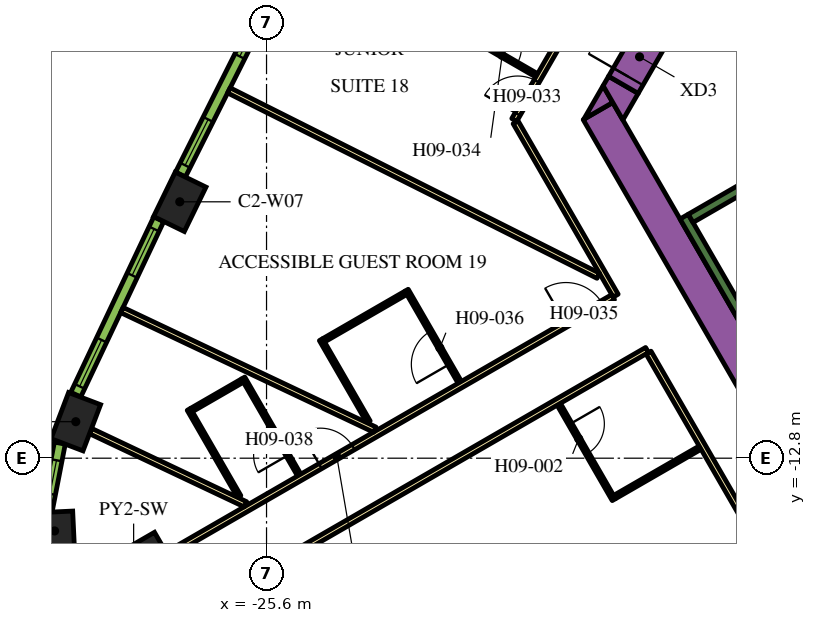
"""IFC4 building model, lengths in metres.
Left out: names, types, materials, properties, quantities, classifications, styles, units other than length and angle.
Written with IfcOpenShell. Run it as: python <this file> out.ifc"""

import sys

from ifc_helpers import new_model, si_unit, direction, frame, frame_2d, origin, origin_2d, place, context, subcontext, project, spatial, polyline, rectangle, outline, extrude, element, fill, save


model = new_model("IFC4")
c1 = context("Model", 3, precision=1e-05, world=origin(), true_north=direction((0.0, 1.0)))
c2 = subcontext(c1, "Body", "Model", "MODEL_VIEW")
j1 = project(units=[si_unit("LENGTHUNIT", "METRE"), si_unit("PLANEANGLEUNIT", "RADIAN")], contexts=[c1])
p1 = place(None, origin())
s1 = spatial("IfcSite", under=j1, at=p1, CompositionType="ELEMENT")
p2 = place(p1, origin())
s2 = spatial("IfcBuilding", under=s1, at=p2, CompositionType="ELEMENT")
p3 = place(p2, frame((0.0, 0.0, 118.8)))
s3 = spatial("IfcBuildingStorey", under=s2, at=p3, CompositionType="ELEMENT", Elevation=118.8)
p4 = place(p3, frame((-29.097, -16.799, 0.0), z_axis=(0.0, 0.0, 1.0), x_axis=(-0.866025403784, -0.5, 0.0)))
e1 = element("IfcColumn", 1, at=p4, inside=s3, PredefinedType="COLUMN", context=c2, shape_type="SweptSolid", body=[
    extrude(rectangle(XDim=3.0, YDim=3.0, at=origin_2d()), origin(), (0.0, 0.0, 1.0), 3.9),
])
for number, where, z_axis, x_axis in (
    (2, (-27.883, -6.054, 0.0), (0.0, 0.0, 1.0), (-0.438, -0.899, 0.0)),
    (3, (-30.619, -11.839, 0.0), (0.0, 0.0, 1.0), (-0.355, -0.935, 0.0)),
):
    element("IfcColumn", number, at=place(p3, frame(where, z_axis=z_axis, x_axis=x_axis)), inside=s3, PredefinedType="COLUMN", context=c2, shape_type="SweptSolid", body=[
        extrude(rectangle(XDim=1.3, YDim=0.9, at=origin_2d()), origin(), (0.0, 0.0, 1.0), 3.9),
    ])
p5 = place(p3, frame((-31.177, -14.714, 0.0), z_axis=(0.0, 0.0, 1.0), x_axis=(0.046756026083, -0.998906338965, 0.0)))
e4 = element("IfcColumn", 4, at=p5, inside=s3, PredefinedType="COLUMN", context=c2, shape_type="SweptSolid", body=[
    extrude(rectangle(XDim=1.0, YDim=1.0, at=origin_2d()), origin(), (0.0, 0.0, 1.0), 3.9),
])
p6 = place(p3, frame((-12.134, -11.883, 0.0), z_axis=(0.0, 0.0, 1.0), x_axis=(-0.500005339912, 0.866022320763, 0.0)))
e5 = element("IfcWall", 5, at=p6, inside=s3, PredefinedType="SOLIDWALL", context=c2, shape_type="SweptSolid", body=[
    extrude(rectangle(XDim=9.488, YDim=0.9, at=frame_2d((4.744, 0.0))), origin(), (0.0, 0.0, 1.0), 3.9),
])
p7 = place(p3, origin())
e6 = element("IfcWall", 6, at=p7, inside=s3, PredefinedType="SOLIDWALL", context=c2, shape_type="SweptSolid", body=[
    extrude(outline(polyline([(-16.489, -3.44), (-17.251, -3.88), (-16.743, -3.0), (-16.489, -3.44)])), origin(), (0.0, 0.0, 1.0), 3.9),
])
e7 = element("IfcWall", 7, at=p7, inside=s3, PredefinedType="SOLIDWALL", context=c2, shape_type="SweptSolid", body=[
    extrude(outline(polyline([(-15.82, -3.201), (-16.223, -3.9), (-16.743, -3.0), (-16.599, -2.751), (-15.82, -3.201)])), origin(), (0.0, 0.0, 1.0), 3.9),
])
p8 = place(p3, frame((-12.885, -9.431, 0.0), z_axis=(0.0, 0.0, 1.0), x_axis=(-0.500020560727, 0.866013532718, 0.0)))
e8 = element("IfcWall", 8, at=p8, inside=s3, PredefinedType="SOLIDWALL", context=c2, shape_type="SweptSolid", body=[
    extrude(rectangle(XDim=3.45, YDim=0.25, at=frame_2d((1.725, 0.0))), origin(), (0.0, 0.0, 1.0), 3.9),
])
p9 = place(p3, frame((-14.44, -6.49, 0.0), z_axis=(0.0, 0.0, 1.0), x_axis=(0.866022966069, 0.500004222222, 0.0)))
e9 = element("IfcWall", 9, at=p9, inside=s3, PredefinedType="SOLIDWALL", context=c2, shape_type="SweptSolid", body=[
    extrude(rectangle(XDim=6.8, YDim=0.25, at=frame_2d((3.4, 0.0))), origin(), (0.0, 0.0, 1.0), 3.9),
])
p10 = place(p3, frame((-16.209, -2.976, 0.0), z_axis=(0.0, 0.0, 1.0), x_axis=(0.499954529098, 0.86605165483, 0.0)))
e10 = element("IfcWall", 10, at=p10, inside=s3, PredefinedType="SOLIDWALL", context=c2, shape_type="SweptSolid", body=[
    extrude(rectangle(XDim=1.7, YDim=0.9, at=frame_2d((0.85, 0.0))), origin(), (0.0, 0.0, 1.0), 3.9),
])
p11 = place(p10, frame((0.25, 0.0, 0.0)))
e11 = element("IfcOpeningElement", 11, at=p11, cuts=e10, PredefinedType="OPENING", context=c2, shape_type="SweptSolid", body=[
    extrude(rectangle(XDim=1.2, YDim=2.1, at=frame_2d((0.6, 1.05))), frame((0.0, 0.46, 0.0), z_axis=(0.0, -1.0, 0.0), x_axis=(1.0, 0.0, 0.0)), (0.0, 0.0, 1.0), 0.92),
])
p12 = place(p3, frame((-19.081, -3.9, 0.0), z_axis=(0.0, 0.0, 1.0), x_axis=(0.499998313975, 0.866026377209, 0.0)))
e12 = element("IfcWall", 12, at=p12, inside=s3, PredefinedType="PARTITIONING", context=c2, shape_type="SweptSolid", body=[
    extrude(rectangle(XDim=25.766, YDim=0.15, at=frame_2d((12.883, 0.0))), origin(), (0.0, 0.0, 1.0), 2.75),
])
p13 = place(p12, frame((19.306, 0.0, 0.0)))
e13 = element("IfcOpeningElement", 13, at=p13, cuts=e12, PredefinedType="OPENING", context=c2, shape_type="SweptSolid", body=[
    extrude(rectangle(XDim=1.0, YDim=2.1, at=frame_2d((0.5, 1.05))), frame((0.0, 0.085, 0.0), z_axis=(0.0, -1.0, 0.0), x_axis=(1.0, 0.0, 0.0)), (0.0, 0.0, 1.0), 0.17),
])
p14 = place(p12, frame((18.0, 0.0, 0.0)))
e14 = element("IfcOpeningElement", 14, at=p14, cuts=e12, PredefinedType="OPENING", context=c2, shape_type="SweptSolid", body=[
    extrude(rectangle(XDim=1.0, YDim=2.1, at=frame_2d((0.5, 1.05))), frame((0.0, 0.085, 0.0), z_axis=(0.0, -1.0, 0.0), x_axis=(1.0, 0.0, 0.0)), (0.0, 0.0, 1.0), 0.17),
])
p15 = place(p12, frame((7.793, 0.0, 0.0)))
e15 = element("IfcOpeningElement", 15, at=p15, cuts=e12, PredefinedType="OPENING", context=c2, shape_type="SweptSolid", body=[
    extrude(rectangle(XDim=0.9, YDim=2.1, at=frame_2d((0.45, 1.05))), frame((0.0, 0.085, 0.0), z_axis=(0.0, -1.0, 0.0), x_axis=(1.0, 0.0, 0.0)), (0.0, 0.0, 1.0), 0.17),
])
p16 = place(p12, frame((4.674, 0.0, 0.0)))
e16 = element("IfcOpeningElement", 16, at=p16, cuts=e12, PredefinedType="OPENING", context=c2, shape_type="SweptSolid", body=[
    extrude(rectangle(XDim=0.9, YDim=2.1, at=frame_2d((0.45, 1.05))), frame((0.0, 0.085, 0.0), z_axis=(0.0, -1.0, 0.0), x_axis=(1.0, 0.0, 0.0)), (0.0, 0.0, 1.0), 0.17),
])
p17 = place(p12, frame((0.18, 0.0, 0.0)))
e17 = element("IfcOpeningElement", 17, at=p17, cuts=e12, PredefinedType="OPENING", context=c2, shape_type="SweptSolid", body=[
    extrude(rectangle(XDim=1.0, YDim=2.1, at=frame_2d((0.5, 1.05))), frame((0.0, 0.085, 0.0), z_axis=(0.0, -1.0, 0.0), x_axis=(1.0, 0.0, 0.0)), (0.0, 0.0, 1.0), 0.17),
])
p18 = place(p3, frame((-16.412, -8.523, 0.0), z_axis=(0.0, 0.0, 1.0), x_axis=(-0.500001929737, 0.866024289647, 0.0)))
e18 = element("IfcWall", 18, at=p18, inside=s3, PredefinedType="PARTITIONING", context=c2, shape_type="SweptSolid", body=[
    extrude(rectangle(XDim=5.268, YDim=0.15, at=frame_2d((2.634, 0.0))), origin(), (0.0, 0.0, 1.0), 2.75),
])
p19 = place(p3, frame((-28.211, -15.335, 0.0), z_axis=(0.0, 0.0, 1.0), x_axis=(0.866025884867, 0.49999916674, 0.0)))
e19 = element("IfcWall", 19, at=p19, inside=s3, PredefinedType="PARTITIONING", context=c2, shape_type="SweptSolid", body=[
    extrude(rectangle(XDim=13.543, YDim=0.15, at=frame_2d((6.772, 0.0))), origin(), (0.0, 0.0, 1.0), 2.75),
])
p20 = place(p19, frame((12.114, 0.0, 0.0)))
e20 = element("IfcOpeningElement", 20, at=p20, cuts=e19, PredefinedType="OPENING", context=c2, shape_type="SweptSolid", body=[
    extrude(rectangle(XDim=1.1, YDim=2.1, at=frame_2d((0.55, 1.05))), frame((0.0, 0.085, 0.0), z_axis=(0.0, -1.0, 0.0), x_axis=(1.0, 0.0, 0.0)), (0.0, 0.0, 1.0), 0.17),
])
p21 = place(p19, frame((4.65, 0.0, 0.0)))
e21 = element("IfcOpeningElement", 21, at=p21, cuts=e19, PredefinedType="OPENING", context=c2, shape_type="SweptSolid", body=[
    extrude(rectangle(XDim=1.0, YDim=2.1, at=frame_2d((0.5, 1.05))), frame((0.0, 0.085, 0.0), z_axis=(0.0, -1.0, 0.0), x_axis=(1.0, 0.0, 0.0)), (0.0, 0.0, 1.0), 0.17),
])
p22 = place(p3, frame((-15.587, -9.952, 0.0), z_axis=(0.0, 0.0, 1.0), x_axis=(-0.866017869832, -0.500013048961, 0.0)))
e22 = element("IfcWall", 22, at=p22, inside=s3, PredefinedType="PARTITIONING", context=c2, shape_type="SweptSolid", body=[
    extrude(rectangle(XDim=13.624, YDim=0.15, at=frame_2d((6.812, 0.0))), origin(), (0.0, 0.0, 1.0), 2.75),
])
p23 = place(p22, frame((12.344, 0.0, 0.0)))
e23 = element("IfcOpeningElement", 23, at=p23, cuts=e22, PredefinedType="OPENING", context=c2, shape_type="SweptSolid", body=[
    extrude(rectangle(XDim=1.1, YDim=2.1, at=frame_2d((0.55, 1.05))), frame((0.0, 0.085, 0.0), z_axis=(0.0, -1.0, 0.0), x_axis=(1.0, 0.0, 0.0)), (0.0, 0.0, 1.0), 0.17),
])
p24 = place(p3, frame((-12.918, -14.575, 0.0), z_axis=(0.0, 0.0, 1.0), x_axis=(-0.500009150678, 0.866020120573, 0.0)))
e24 = element("IfcWall", 24, at=p24, inside=s3, PredefinedType="PARTITIONING", context=c2, shape_type="SweptSolid", body=[
    extrude(rectangle(XDim=5.258, YDim=0.15, at=frame_2d((2.629, 0.0))), origin(), (0.0, 0.0, 1.0), 2.75),
])
p25 = place(p3, frame((-30.231, -12.085, 0.0), z_axis=(0.0, 0.0, 1.0), x_axis=(0.904001132572, -0.427530060122, 0.0)))
e25 = element("IfcWall", 25, at=p25, inside=s3, PredefinedType="PARTITIONING", context=c2, shape_type="SweptSolid", body=[
    extrude(rectangle(XDim=4.51, YDim=0.15, at=frame_2d((2.255, 0.0))), origin(), (0.0, 0.0, 1.0), 2.75),
])
p26 = place(p3, frame((-29.406, -8.901, 0.0), z_axis=(0.0, 0.0, 1.0), x_axis=(0.904002363742, -0.427527456836, 0.0)))
e26 = element("IfcWall", 26, at=p26, inside=s3, PredefinedType="PARTITIONING", context=c2, shape_type="SweptSolid", body=[
    extrude(rectangle(XDim=7.362, YDim=0.15, at=frame_2d((3.681, 0.0))), origin(), (0.0, 0.0, 1.0), 2.75),
])
p27 = place(p3, frame((-26.591, -3.122, 0.0), z_axis=(0.0, 0.0, 1.0), x_axis=(0.893766213273, -0.448533115847, 0.0)))
e27 = element("IfcWall", 27, at=p27, inside=s3, PredefinedType="PARTITIONING", context=c2, shape_type="SweptSolid", body=[
    extrude(rectangle(XDim=10.875, YDim=0.15, at=frame_2d((5.438, 0.0))), origin(), (0.0, 0.0, 1.0), 2.75),
])
p28 = place(p3, frame((-17.91, -11.38, 0.0), z_axis=(0.0, 0.0, 1.0), x_axis=(0.499987231761, -0.866032775405, 0.0)))
e28 = element("IfcWall", 28, at=p28, inside=s3, PredefinedType="PARTITIONING", context=c2, shape_type="SweptSolid", body=[
    extrude(rectangle(XDim=2.9, YDim=0.1, at=frame_2d((1.45, 0.0))), origin(), (0.0, 0.0, 1.0), 2.75),
])
p29 = place(p28, frame((0.6, 0.0, 0.0)))
e29 = element("IfcOpeningElement", 29, at=p29, cuts=e28, PredefinedType="OPENING", context=c2, shape_type="SweptSolid", body=[
    extrude(rectangle(XDim=0.9, YDim=2.1, at=frame_2d((0.45, 1.05))), frame((0.0, 0.06, 0.0), z_axis=(0.0, -1.0, 0.0), x_axis=(1.0, 0.0, 0.0)), (0.0, 0.0, 1.0), 0.12),
])
p30 = place(p3, frame((-16.442, -13.823, 0.0), z_axis=(0.0, 0.0, 1.0), x_axis=(0.866021400173, 0.500006934395, 0.0)))
e30 = element("IfcWall", 30, at=p30, inside=s3, PredefinedType="PARTITIONING", context=c2, shape_type="SweptSolid", body=[
    extrude(rectangle(XDim=2.6, YDim=0.1, at=frame_2d((1.3, 0.0))), origin(), (0.0, 0.0, 1.0), 2.75),
])
p31 = place(p3, frame((-20.829, -1.377, 0.0), z_axis=(0.0, 0.0, 1.0), x_axis=(0.866036505625, -0.499980770555, 0.0)))
e31 = element("IfcWall", 31, at=p31, inside=s3, PredefinedType="PARTITIONING", context=c2, shape_type="SweptSolid", body=[
    extrude(rectangle(XDim=2.7, YDim=0.1, at=frame_2d((1.35, 0.0))), origin(), (0.0, 0.0, 1.0), 2.75),
])
p32 = place(p31, frame((1.2, 0.0, 0.0)))
e32 = element("IfcOpeningElement", 32, at=p32, cuts=e31, PredefinedType="OPENING", context=c2, shape_type="SweptSolid", body=[
    extrude(rectangle(XDim=0.9, YDim=2.1, at=frame_2d((0.45, 1.05))), frame((0.0, 0.06, 0.0), z_axis=(0.0, -1.0, 0.0), x_axis=(1.0, 0.0, 0.0)), (0.0, 0.0, 1.0), 0.12),
])
p33 = place(p3, frame((-20.515, -10.805, 0.0), z_axis=(0.0, 0.0, 1.0), x_axis=(-0.49994636267, 0.866056369097, 0.0)))
e33 = element("IfcWall", 33, at=p33, inside=s3, PredefinedType="PARTITIONING", context=c2, shape_type="SweptSolid", body=[
    extrude(rectangle(XDim=2.8, YDim=0.1, at=frame_2d((1.4, 0.0))), origin(), (0.0, 0.0, 1.0), 2.75),
])
p34 = place(p33, frame((0.55, 0.0, 0.0)))
e34 = element("IfcOpeningElement", 34, at=p34, cuts=e33, PredefinedType="OPENING", context=c2, shape_type="SweptSolid", body=[
    extrude(rectangle(XDim=1.0, YDim=2.1, at=frame_2d((0.5, 1.05))), frame((0.0, 0.06, 0.0), z_axis=(0.0, -1.0, 0.0), x_axis=(1.0, 0.0, 0.0)), (0.0, 0.0, 1.0), 0.12),
])
for number, where, z_axis, x_axis in (
    (35, (-21.933, -8.448, 0.0), (0.0, 0.0, 1.0), (-0.866, -0.5, 0.0)),
    (36, (-22.916, -11.845, 0.0), (0.0, 0.0, 1.0), (-0.5, 0.866, 0.0)),
):
    element("IfcWall", number, at=place(p3, frame(where, z_axis=z_axis, x_axis=x_axis)), inside=s3, PredefinedType="PARTITIONING", context=c2, shape_type="SweptSolid", body=[
        extrude(rectangle(XDim=2.5, YDim=0.1, at=frame_2d((1.25, 0.0))), origin(), (0.0, 0.0, 1.0), 2.75),
    ])
p35 = place(p3, frame((-24.74, -13.244, 0.0), z_axis=(0.0, 0.0, 1.0), x_axis=(-0.500037662692, 0.866003658127, 0.0)))
e37 = element("IfcWall", 37, at=p35, inside=s3, PredefinedType="PARTITIONING", context=c2, shape_type="SweptSolid", body=[
    extrude(rectangle(XDim=2.95, YDim=0.1, at=frame_2d((1.475, 0.0))), origin(), (0.0, 0.0, 1.0), 2.75),
])
p36 = place(p35, frame((0.6, 0.0, 0.0)))
e38 = element("IfcOpeningElement", 38, at=p36, cuts=e37, PredefinedType="OPENING", context=c2, shape_type="SweptSolid", body=[
    extrude(rectangle(XDim=0.9, YDim=2.1, at=frame_2d((0.45, 1.05))), frame((0.0, 0.06, 0.0), z_axis=(0.0, -1.0, 0.0), x_axis=(1.0, 0.0, 0.0)), (0.0, 0.0, 1.0), 0.12),
])
p37 = place(p3, frame((-26.233, -10.758, 0.0), z_axis=(0.0, 0.0, 1.0), x_axis=(-0.866043940782, -0.499967891604, 0.0)))
e39 = element("IfcWall", 39, at=p37, inside=s3, PredefinedType="PARTITIONING", context=c2, shape_type="SweptSolid", body=[
    extrude(rectangle(XDim=1.55, YDim=0.1, at=frame_2d((0.775, 0.0))), origin(), (0.0, 0.0, 1.0), 2.75),
])
p38 = place(p3, frame((-26.319, -13.81, 0.0), z_axis=(0.0, 0.0, 1.0), x_axis=(-0.499953715521, 0.866052124492, 0.0)))
e40 = element("IfcWall", 40, at=p38, inside=s3, PredefinedType="PARTITIONING", context=c2, shape_type="SweptSolid", body=[
    extrude(rectangle(XDim=2.65, YDim=0.1, at=frame_2d((1.325, 0.0))), origin(), (0.0, 0.0, 1.0), 2.75),
])
p39 = place(p3, frame((-25.576, -0.778, 0.0), z_axis=(0.0, 0.0, 1.0), x_axis=(-0.448534297211, -0.893765620409, 0.0)))
e41 = element("IfcWall", 41, at=p39, inside=s3, PredefinedType="SOLIDWALL", context=c2, shape_type="SweptSolid", body=[
    extrude(rectangle(XDim=5.1, YDim=0.29, at=frame_2d((2.55, 0.0))), origin(), (0.0, 0.0, 1.0), 3.65),
])
p40 = place(p39, frame((0.272, 0.0, 0.9)))
e42 = element("IfcOpeningElement", 42, at=p40, cuts=e41, PredefinedType="OPENING", context=c2, shape_type="SweptSolid", body=[
    extrude(rectangle(XDim=1.35, YDim=2.15, at=frame_2d((0.675, 1.075))), frame((0.0, 0.155, 0.0), z_axis=(0.0, -1.0, 0.0), x_axis=(1.0, 0.0, 0.0)), (0.0, 0.0, 1.0), 0.31),
])
p41 = place(p39, frame((3.478, 0.0, 0.9)))
e43 = element("IfcOpeningElement", 43, at=p41, cuts=e41, PredefinedType="OPENING", context=c2, shape_type="SweptSolid", body=[
    extrude(rectangle(XDim=1.35, YDim=2.15, at=frame_2d((0.675, 1.075))), frame((0.0, 0.155, 0.0), z_axis=(0.0, -1.0, 0.0), x_axis=(1.0, 0.0, 0.0)), (0.0, 0.0, 1.0), 0.31),
])
p42 = place(p3, frame((-28.436, -6.511, 0.0), z_axis=(0.0, 0.0, 1.0), x_axis=(-0.427543726596, -0.903994669148, 0.0)))
e44 = element("IfcWall", 44, at=p42, inside=s3, PredefinedType="SOLIDWALL", context=c2, shape_type="SweptSolid", body=[
    extrude(rectangle(XDim=5.107, YDim=0.29, at=frame_2d((2.553, 0.0))), origin(), (0.0, 0.0, 1.0), 3.65),
])
p43 = place(p42, frame((0.285, 0.0, 0.9)))
e45 = element("IfcOpeningElement", 45, at=p43, cuts=e44, PredefinedType="OPENING", context=c2, shape_type="SweptSolid", body=[
    extrude(rectangle(XDim=1.35, YDim=2.15, at=frame_2d((0.675, 1.075))), frame((0.0, 0.155, 0.0), z_axis=(0.0, -1.0, 0.0), x_axis=(1.0, 0.0, 0.0)), (0.0, 0.0, 1.0), 0.31),
])
p44 = place(p42, frame((3.516, 0.0, 0.9)))
e46 = element("IfcOpeningElement", 46, at=p44, cuts=e44, PredefinedType="OPENING", context=c2, shape_type="SweptSolid", body=[
    extrude(rectangle(XDim=1.35, YDim=2.15, at=frame_2d((0.675, 1.075))), frame((0.0, 0.155, 0.0), z_axis=(0.0, -1.0, 0.0), x_axis=(1.0, 0.0, 0.0)), (0.0, 0.0, 1.0), 0.31),
])
p45 = place(p3, frame((-31.039, -12.403, 0.0), z_axis=(0.0, 0.0, 1.0), x_axis=(-0.190409913989, -0.981704672829, 0.0)))
e47 = element("IfcWall", 47, at=p45, inside=s3, PredefinedType="SOLIDWALL", context=c2, shape_type="SweptSolid", body=[
    extrude(rectangle(XDim=1.819, YDim=0.29, at=frame_2d((0.91, 0.0))), origin(), (0.0, 0.0, 1.0), 3.65),
])
p46 = place(p45, frame((0.46, 0.0, 0.9)))
e48 = element("IfcOpeningElement", 48, at=p46, cuts=e47, PredefinedType="OPENING", context=c2, shape_type="SweptSolid", body=[
    extrude(rectangle(XDim=0.9, YDim=2.15, at=frame_2d((0.45, 1.075))), frame((0.0, 0.155, 0.0), z_axis=(0.0, -1.0, 0.0), x_axis=(1.0, 0.0, 0.0)), (0.0, 0.0, 1.0), 0.31),
])
p47 = place(p11, origin())
e49 = element("IfcDoor", 49, at=p47, inside=s3, OperationType="SINGLE_SWING_LEFT", PredefinedType="DOOR", context=c2, shape_type="SweptSolid", body=[
    extrude(rectangle(XDim=1.2, YDim=2.1, at=frame_2d((0.6, 1.05))), frame((0.0, 0.025, 0.0), z_axis=(0.0, -1.0, 0.0), x_axis=(1.0, 0.0, 0.0)), (0.0, 0.0, 1.0), 0.05),
])
fill(e11, e49)
p48 = place(p29, origin())
e50 = element("IfcDoor", 50, at=p48, inside=s3, OperationType="SINGLE_SWING_LEFT", PredefinedType="DOOR", context=c2, shape_type="SweptSolid", body=[
    extrude(rectangle(XDim=0.9, YDim=2.1, at=frame_2d((0.45, 1.05))), frame((0.0, 0.025, 0.0), z_axis=(0.0, -1.0, 0.0), x_axis=(1.0, 0.0, 0.0)), (0.0, 0.0, 1.0), 0.05),
])
fill(e29, e50)
p49 = place(p17, origin())
e51 = element("IfcDoor", 51, at=p49, inside=s3, OperationType="SINGLE_SWING_LEFT", PredefinedType="DOOR", context=c2, shape_type="SweptSolid", body=[
    extrude(rectangle(XDim=1.0, YDim=2.1, at=frame_2d((0.5, 1.05))), frame((0.0, 0.025, 0.0), z_axis=(0.0, -1.0, 0.0), x_axis=(1.0, 0.0, 0.0)), (0.0, 0.0, 1.0), 0.05),
])
fill(e17, e51)
p50 = place(p32, origin())
e52 = element("IfcDoor", 52, at=p50, inside=s3, OperationType="SINGLE_SWING_RIGHT", PredefinedType="DOOR", context=c2, shape_type="SweptSolid", body=[
    extrude(rectangle(XDim=0.9, YDim=2.1, at=frame_2d((0.45, 1.05))), frame((0.0, 0.025, 0.0), z_axis=(0.0, -1.0, 0.0), x_axis=(1.0, 0.0, 0.0)), (0.0, 0.0, 1.0), 0.05),
])
fill(e32, e52)
p51 = place(p20, origin())
e53 = element("IfcDoor", 53, at=p51, inside=s3, OperationType="SINGLE_SWING_RIGHT", PredefinedType="DOOR", context=c2, shape_type="SweptSolid", body=[
    extrude(rectangle(XDim=1.1, YDim=2.1, at=frame_2d((0.55, 1.05))), frame((0.0, 0.025, 0.0), z_axis=(0.0, -1.0, 0.0), x_axis=(1.0, 0.0, 0.0)), (0.0, 0.0, 1.0), 0.05),
])
fill(e20, e53)
p52 = place(p34, origin())
e54 = element("IfcDoor", 54, at=p52, inside=s3, OperationType="SINGLE_SWING_LEFT", PredefinedType="DOOR", context=c2, shape_type="SweptSolid", body=[
    extrude(rectangle(XDim=1.0, YDim=2.1, at=frame_2d((0.5, 1.05))), frame((0.0, 0.025, 0.0), z_axis=(0.0, -1.0, 0.0), x_axis=(1.0, 0.0, 0.0)), (0.0, 0.0, 1.0), 0.05),
])
fill(e34, e54)
p53 = place(p21, origin())
e55 = element("IfcDoor", 55, at=p53, inside=s3, OperationType="SINGLE_SWING_RIGHT", PredefinedType="DOOR", context=c2, shape_type="SweptSolid", body=[
    extrude(rectangle(XDim=1.0, YDim=2.1, at=frame_2d((0.5, 1.05))), frame((0.0, 0.025, 0.0), z_axis=(0.0, -1.0, 0.0), x_axis=(1.0, 0.0, 0.0)), (0.0, 0.0, 1.0), 0.05),
])
fill(e21, e55)
p54 = place(p36, origin())
e56 = element("IfcDoor", 56, at=p54, inside=s3, OperationType="SINGLE_SWING_LEFT", PredefinedType="DOOR", context=c2, shape_type="SweptSolid", body=[
    extrude(rectangle(XDim=0.9, YDim=2.1, at=frame_2d((0.45, 1.05))), frame((0.0, 0.025, 0.0), z_axis=(0.0, -1.0, 0.0), x_axis=(1.0, 0.0, 0.0)), (0.0, 0.0, 1.0), 0.05),
])
fill(e38, e56)
p55 = place(p40, origin())
e57 = element("IfcWindow", 57, at=p55, inside=s3, PartitioningType="DOUBLE_PANEL_VERTICAL", PredefinedType="WINDOW", context=c2, shape_type="SweptSolid", body=[
    extrude(rectangle(XDim=1.35, YDim=2.15, at=frame_2d((0.675, 1.075))), frame((0.0, 0.015, 0.0), z_axis=(0.0, -1.0, 0.0), x_axis=(1.0, 0.0, 0.0)), (0.0, 0.0, 1.0), 0.06),
])
fill(e42, e57)
p56 = place(p41, origin())
e58 = element("IfcWindow", 58, at=p56, inside=s3, PartitioningType="DOUBLE_PANEL_VERTICAL", PredefinedType="WINDOW", context=c2, shape_type="SweptSolid", body=[
    extrude(rectangle(XDim=1.35, YDim=2.15, at=frame_2d((0.675, 1.075))), frame((0.0, 0.015, 0.0), z_axis=(0.0, -1.0, 0.0), x_axis=(1.0, 0.0, 0.0)), (0.0, 0.0, 1.0), 0.06),
])
fill(e43, e58)
p57 = place(p43, origin())
e59 = element("IfcWindow", 59, at=p57, inside=s3, PartitioningType="DOUBLE_PANEL_VERTICAL", PredefinedType="WINDOW", context=c2, shape_type="SweptSolid", body=[
    extrude(rectangle(XDim=1.35, YDim=2.15, at=frame_2d((0.675, 1.075))), frame((0.0, 0.015, 0.0), z_axis=(0.0, -1.0, 0.0), x_axis=(1.0, 0.0, 0.0)), (0.0, 0.0, 1.0), 0.06),
])
fill(e45, e59)
p58 = place(p44, origin())
e60 = element("IfcWindow", 60, at=p58, inside=s3, PartitioningType="DOUBLE_PANEL_VERTICAL", PredefinedType="WINDOW", context=c2, shape_type="SweptSolid", body=[
    extrude(rectangle(XDim=1.35, YDim=2.15, at=frame_2d((0.675, 1.075))), frame((0.0, 0.015, 0.0), z_axis=(0.0, -1.0, 0.0), x_axis=(1.0, 0.0, 0.0)), (0.0, 0.0, 1.0), 0.06),
])
fill(e46, e60)
p59 = place(p46, origin())
e61 = element("IfcWindow", 61, at=p59, inside=s3, PartitioningType="SINGLE_PANEL", PredefinedType="WINDOW", context=c2, shape_type="SweptSolid", body=[
    extrude(rectangle(XDim=0.9, YDim=2.15, at=frame_2d((0.45, 1.075))), frame((0.0, 0.015, 0.0), z_axis=(0.0, -1.0, 0.0), x_axis=(1.0, 0.0, 0.0)), (0.0, 0.0, 1.0), 0.06),
])
fill(e48, e61)
save(model, sys.argv[1])
